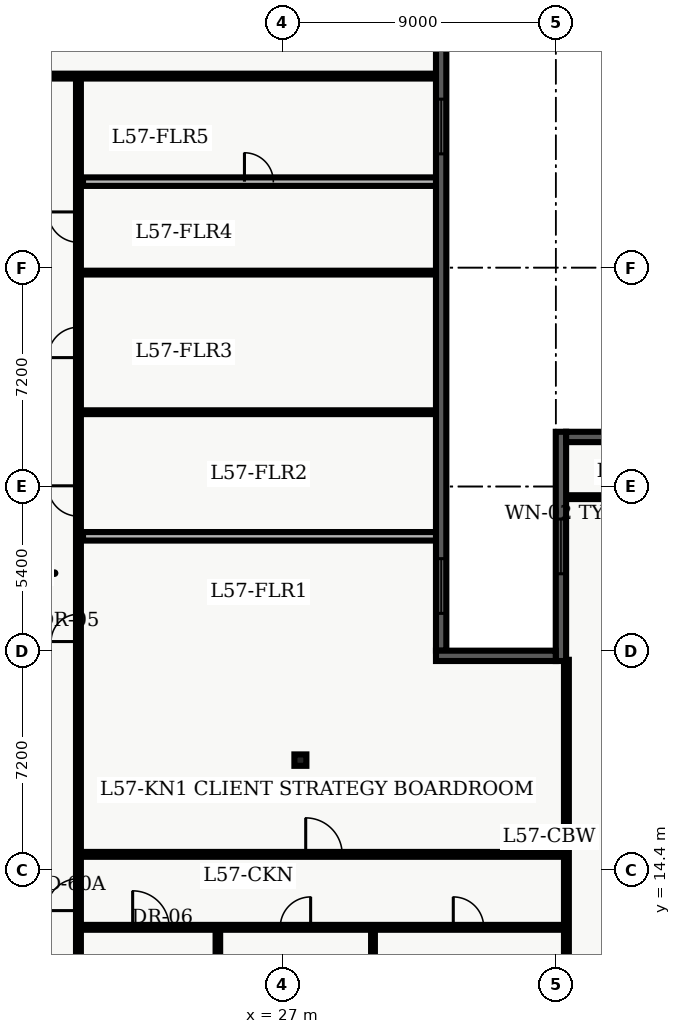
"""IFC4 building model, lengths in metres.
Left out: names, types, materials, properties, quantities, classifications, styles, units other than length and angle.
Written with IfcOpenShell. Run it as: python <this file> out.ifc"""

import sys

from ifc_helpers import new_model, entity, si_unit, converted_unit, direction, frame, origin_with_axes, origin_2d_with_axis, place, context, subcontext, project, spatial, polyline, rectangle, i_section, outline, extrude, element, fill, save


model = new_model("IFC4")
c1 = context("Model", 3, precision=1e-05, world=origin_with_axes(), true_north=direction((0.0, 1.0)))
c2 = subcontext(c1, "Body", "Model", "MODEL_VIEW")
j1 = project(units=[si_unit("LENGTHUNIT", "METRE"), converted_unit("PLANEANGLEUNIT", "DEGREE", entity("IfcPlaneAngleMeasure", 0.017), si_unit("PLANEANGLEUNIT", "RADIAN"), dimensions=[0, 0, 0, 0, 0, 0, 0])], contexts=[c1])
p1 = place(None, origin_with_axes())
s1 = spatial("IfcSite", under=j1, at=p1, CompositionType="ELEMENT")
p2 = place(p1, origin_with_axes())
s2 = spatial("IfcBuilding", under=s1, at=p2, CompositionType="ELEMENT")
p3 = place(p2, frame((0.0, 0.0, 232.5), z_axis=(0.0, 0.0, 1.0), x_axis=(1.0, 0.0, 0.0)))
s3 = spatial("IfcBuildingStorey", under=s2, at=p3, CompositionType="ELEMENT", Elevation=232.5)
p4 = place(p3, frame((27.6, 18.0, 0.0), z_axis=(0.0, 0.0, 1.0), x_axis=(1.0, 0.0, 0.0)))
e1 = element("IfcColumn", 1, at=p4, inside=s3, PredefinedType="COLUMN", context=c2, shape_type="SweptSolid", body=[
    extrude(i_section(OverallWidth=0.394, OverallDepth=0.375, WebThickness=0.017, FlangeThickness=0.028, FilletRadius=0.02, at=origin_2d_with_axis()), origin_with_axes(), (0.0, 0.0, 1.0), 3.9),
])
p5 = place(p3, frame((7.1, 40.5, 0.0), z_axis=(0.0, 0.0, 1.0), x_axis=(1.0, 0.0, 0.0)))
e2 = element("IfcWall", 2, at=p5, inside=s3, PredefinedType="PARTITIONING", context=c2, shape_type="SweptSolid", body=[
    extrude(outline(polyline([(0.0, -0.08), (24.965, -0.08), (24.965, 0.08), (0.0, 0.08), (0.0, -0.08)])), origin_with_axes(), (0.0, 0.0, 1.0), 2.7),
])
p6 = place(p5, frame((2.145, 0.0, 0.0), z_axis=(0.0, 0.0, 1.0), x_axis=(1.0, 0.0, 0.0)))
e3 = element("IfcOpeningElement", 3, at=p6, cuts=e2, PredefinedType="OPENING", context=c2, shape_type="SweptSolid", body=[
    extrude(rectangle(XDim=1.0, YDim=0.18, at=origin_2d_with_axis()), origin_with_axes(), (0.0, 0.0, 1.0), 2.15),
])
p7 = place(p5, frame((5.514, 0.0, 0.0), z_axis=(0.0, 0.0, 1.0), x_axis=(1.0, 0.0, 0.0)))
e4 = element("IfcOpeningElement", 4, at=p7, cuts=e2, PredefinedType="OPENING", context=c2, shape_type="SweptSolid", body=[
    extrude(rectangle(XDim=1.0, YDim=0.18, at=origin_2d_with_axis()), origin_with_axes(), (0.0, 0.0, 1.0), 2.15),
])
p8 = place(p5, frame((8.217, 0.0, 0.0), z_axis=(0.0, 0.0, 1.0), x_axis=(1.0, 0.0, 0.0)))
e5 = element("IfcOpeningElement", 5, at=p8, cuts=e2, PredefinedType="OPENING", context=c2, shape_type="SweptSolid", body=[
    extrude(rectangle(XDim=1.0, YDim=0.18, at=origin_2d_with_axis()), origin_with_axes(), (0.0, 0.0, 1.0), 2.15),
])
p9 = place(p5, frame((11.083, 0.0, 0.0), z_axis=(0.0, 0.0, 1.0), x_axis=(1.0, 0.0, 0.0)))
e6 = element("IfcOpeningElement", 6, at=p9, cuts=e2, PredefinedType="OPENING", context=c2, shape_type="SweptSolid", body=[
    extrude(rectangle(XDim=1.0, YDim=0.18, at=origin_2d_with_axis()), origin_with_axes(), (0.0, 0.0, 1.0), 2.15),
])
p10 = place(p3, frame((20.3, 7.8, 0.0), z_axis=(0.0, 0.0, 1.0), x_axis=(0.0, 1.0, 0.0)))
e7 = element("IfcWall", 7, at=p10, inside=s3, PredefinedType="PARTITIONING", context=c2, shape_type="SweptSolid", body=[
    extrude(outline(polyline([(0.0, -0.08), (32.7, -0.08), (32.7, 0.08), (0.0, 0.08), (0.0, -0.08)])), origin_with_axes(), (0.0, 0.0, 1.0), 2.7),
])
p11 = place(p10, frame((14.55, 0.0, 0.0), z_axis=(0.0, 0.0, 1.0), x_axis=(1.0, 0.0, 0.0)))
e8 = element("IfcOpeningElement", 8, at=p11, cuts=e7, PredefinedType="OPENING", context=c2, shape_type="SweptSolid", body=[
    extrude(rectangle(XDim=0.9, YDim=0.18, at=origin_2d_with_axis()), origin_with_axes(), (0.0, 0.0, 1.0), 2.15),
])
p12 = place(p10, frame((18.723, 0.0, 0.0), z_axis=(0.0, 0.0, 1.0), x_axis=(1.0, 0.0, 0.0)))
e9 = element("IfcOpeningElement", 9, at=p12, cuts=e7, PredefinedType="OPENING", context=c2, shape_type="SweptSolid", body=[
    extrude(rectangle(XDim=1.0, YDim=0.18, at=origin_2d_with_axis()), origin_with_axes(), (0.0, 0.0, 1.0), 2.15),
])
p13 = place(p10, frame((23.94, 0.0, 0.0), z_axis=(0.0, 0.0, 1.0), x_axis=(1.0, 0.0, 0.0)))
e10 = element("IfcOpeningElement", 10, at=p13, cuts=e7, PredefinedType="OPENING", context=c2, shape_type="SweptSolid", body=[
    extrude(rectangle(XDim=1.0, YDim=0.18, at=origin_2d_with_axis()), origin_with_axes(), (0.0, 0.0, 1.0), 2.15),
])
p14 = place(p10, frame((27.732, 0.0, 0.0), z_axis=(0.0, 0.0, 1.0), x_axis=(1.0, 0.0, 0.0)))
e11 = element("IfcOpeningElement", 11, at=p14, cuts=e7, PredefinedType="OPENING", context=c2, shape_type="SweptSolid", body=[
    extrude(rectangle(XDim=1.0, YDim=0.18, at=origin_2d_with_axis()), origin_with_axes(), (0.0, 0.0, 1.0), 2.15),
])
p15 = place(p10, frame((5.775, 0.0, 0.0), z_axis=(0.0, 0.0, 1.0), x_axis=(1.0, 0.0, 0.0)))
e12 = element("IfcOpeningElement", 12, at=p15, cuts=e7, PredefinedType="OPENING", context=c2, shape_type="SweptSolid", body=[
    extrude(rectangle(XDim=1.05, YDim=0.18, at=origin_2d_with_axis()), origin_with_axes(), (0.0, 0.0, 1.0), 2.15),
])
p16 = place(p3, frame((20.45, 25.362, 0.0), z_axis=(0.0, 0.0, 1.0), x_axis=(1.0, 0.0, 0.0)))
e13 = element("IfcWall", 13, at=p16, inside=s3, PredefinedType="PARTITIONING", context=c2, shape_type="SweptSolid", body=[
    extrude(outline(polyline([(0.0, -0.14), (11.615, -0.14), (11.615, 0.14), (0.0, 0.14), (0.0, -0.14)])), origin_with_axes(), (0.0, 0.0, 1.0), 2.7),
])
for number, where, z_axis, x_axis in (
    (14, (20.45, 29.444, 0.0), (0.0, 0.0, 1.0), (1.0, 0.0, 0.0)),
    (15, (20.45, 34.036, 0.0), (0.0, 0.0, 1.0), (1.0, 0.0, 0.0)),
):
    element("IfcWall", number, at=place(p3, frame(where, z_axis=z_axis, x_axis=x_axis)), inside=s3, PredefinedType="PARTITIONING", context=c2, shape_type="SweptSolid", body=[
        extrude(outline(polyline([(0.0, -0.062), (11.615, -0.062), (11.615, 0.062), (0.0, 0.062), (0.0, -0.062)])), origin_with_axes(), (0.0, 0.0, 1.0), 2.7),
    ])
p17 = place(p3, frame((20.45, 37.028, 0.0), z_axis=(0.0, 0.0, 1.0), x_axis=(1.0, 0.0, 0.0)))
e16 = element("IfcWall", 16, at=p17, inside=s3, PredefinedType="PARTITIONING", context=c2, shape_type="SweptSolid", body=[
    extrude(outline(polyline([(0.0, -0.14), (11.615, -0.14), (11.615, 0.14), (0.0, 0.14), (0.0, -0.14)])), origin_with_axes(), (0.0, 0.0, 1.0), 2.7),
])
p18 = place(p17, frame((5.785, 0.0, 0.0), z_axis=(0.0, 0.0, 1.0), x_axis=(1.0, 0.0, 0.0)))
e17 = element("IfcOpeningElement", 17, at=p18, cuts=e16, PredefinedType="OPENING", context=c2, shape_type="SweptSolid", body=[
    extrude(rectangle(XDim=0.95, YDim=0.3, at=origin_2d_with_axis()), origin_with_axes(), (0.0, 0.0, 1.0), 2.15),
])
p19 = place(p3, frame((20.3, 12.5, 0.0), z_axis=(0.0, 0.0, 1.0), x_axis=(1.0, 0.0, 0.0)))
e18 = element("IfcWall", 18, at=p19, inside=s3, PredefinedType="PARTITIONING", context=c2, shape_type="SweptSolid", body=[
    extrude(outline(polyline([(0.0, -0.08), (16.05, -0.08), (16.05, 0.08), (0.0, 0.08), (0.0, -0.08)])), origin_with_axes(), (0.0, 0.0, 1.0), 2.7),
])
p20 = place(p19, frame((2.383, 0.0, 0.0), z_axis=(0.0, 0.0, 1.0), x_axis=(1.0, 0.0, 0.0)))
e19 = element("IfcOpeningElement", 19, at=p20, cuts=e18, PredefinedType="OPENING", context=c2, shape_type="SweptSolid", body=[
    extrude(rectangle(XDim=1.2, YDim=0.18, at=origin_2d_with_axis()), origin_with_axes(), (0.0, 0.0, 1.0), 2.2),
])
p21 = place(p19, frame((7.137, 0.0, 0.0), z_axis=(0.0, 0.0, 1.0), x_axis=(1.0, 0.0, 0.0)))
e20 = element("IfcOpeningElement", 20, at=p21, cuts=e18, PredefinedType="OPENING", context=c2, shape_type="SweptSolid", body=[
    extrude(rectangle(XDim=1.0, YDim=0.18, at=origin_2d_with_axis()), origin_with_axes(), (0.0, 0.0, 1.0), 2.15),
])
p22 = place(p19, frame((12.829, 0.0, 0.0), z_axis=(0.0, 0.0, 1.0), x_axis=(1.0, 0.0, 0.0)))
e21 = element("IfcOpeningElement", 21, at=p22, cuts=e18, PredefinedType="OPENING", context=c2, shape_type="SweptSolid", body=[
    extrude(rectangle(XDim=1.0, YDim=0.18, at=origin_2d_with_axis()), origin_with_axes(), (0.0, 0.0, 1.0), 2.15),
])
p23 = place(p3, frame((20.3, 14.9, 0.0), z_axis=(0.0, 0.0, 1.0), x_axis=(1.0, 0.0, 0.0)))
e22 = element("IfcWall", 22, at=p23, inside=s3, PredefinedType="PARTITIONING", context=c2, shape_type="SweptSolid", body=[
    extrude(outline(polyline([(0.0, -0.08), (16.05, -0.08), (16.05, 0.08), (0.0, 0.08), (0.0, -0.08)])), origin_with_axes(), (0.0, 0.0, 1.0), 2.7),
])
p24 = place(p23, frame((8.075, 0.0, 0.0), z_axis=(0.0, 0.0, 1.0), x_axis=(1.0, 0.0, 0.0)))
e23 = element("IfcOpeningElement", 23, at=p24, cuts=e22, PredefinedType="OPENING", context=c2, shape_type="SweptSolid", body=[
    extrude(rectangle(XDim=1.2, YDim=0.18, at=origin_2d_with_axis()), origin_with_axes(), (0.0, 0.0, 1.0), 2.2),
])
p25 = place(p3, frame((36.35, 4.35, 0.0), z_axis=(0.0, 0.0, 1.0), x_axis=(0.0, 1.0, 0.0)))
e24 = element("IfcWall", 24, at=p25, inside=s3, PredefinedType="PARTITIONING", context=c2, shape_type="SweptSolid", body=[
    extrude(outline(polyline([(0.0, -0.08), (16.95, -0.08), (16.95, 0.08), (0.0, 0.08), (0.0, -0.08)])), origin_with_axes(), (0.0, 0.0, 1.0), 2.7),
])
p26 = place(p3, frame((24.886, 0.335, 0.0), z_axis=(0.0, 0.0, 1.0), x_axis=(0.0, 1.0, 0.0)))
e25 = element("IfcWall", 25, at=p26, inside=s3, PredefinedType="PARTITIONING", context=c2, shape_type="SweptSolid", body=[
    extrude(outline(polyline([(0.0, -0.075), (12.045, -0.075), (12.045, 0.075), (0.0, 0.075), (0.0, -0.075)])), origin_with_axes(), (0.0, 0.0, 1.0), 2.7),
])
p27 = place(p3, frame((29.988, 0.335, 0.0), z_axis=(0.0, 0.0, 1.0), x_axis=(0.0, 1.0, 0.0)))
e26 = element("IfcWall", 26, at=p27, inside=s3, PredefinedType="PARTITIONING", context=c2, shape_type="SweptSolid", body=[
    extrude(outline(polyline([(0.0, -0.062), (12.045, -0.062), (12.045, 0.062), (0.0, 0.062), (0.0, -0.062)])), origin_with_axes(), (0.0, 0.0, 1.0), 2.7),
])
p28 = place(p3, frame((36.335, 26.65, 0.0), z_axis=(0.0, 0.0, 1.0), x_axis=(1.0, 0.0, 0.0)))
e27 = element("IfcWall", 27, at=p28, inside=s3, PredefinedType="PARTITIONING", context=c2, shape_type="SweptSolid", body=[
    extrude(outline(polyline([(0.0, -0.062), (11.195, -0.062), (11.195, 0.062), (0.0, 0.062), (0.0, -0.062)])), origin_with_axes(), (0.0, 0.0, 1.0), 2.7),
])
p29 = place(p28, frame((6.665, 0.0, 0.0), z_axis=(0.0, 0.0, 1.0), x_axis=(1.0, 0.0, 0.0)))
e28 = element("IfcOpeningElement", 28, at=p29, cuts=e27, PredefinedType="OPENING", context=c2, shape_type="SweptSolid", body=[
    extrude(rectangle(XDim=1.0, YDim=0.145, at=origin_2d_with_axis()), origin_with_axes(), (0.0, 0.0, 1.0), 2.15),
])
p30 = place(p3, frame((36.17, 21.26, 0.0), z_axis=(0.0, 0.0, 1.0), x_axis=(0.0, 1.0, 0.0)))
e29 = element("IfcWall", 29, at=p30, inside=s3, PredefinedType="SOLIDWALL", context=c2, shape_type="SweptSolid", body=[
    extrude(outline(polyline([(0.0, -0.17), (7.54, -0.17), (7.54, 0.17), (0.0, 0.17), (0.0, -0.17)])), origin_with_axes(), (0.0, 0.0, 1.0), 3.66),
])
p31 = place(p30, frame((3.77, 0.0, 0.45), z_axis=(0.0, 0.0, 1.0), x_axis=(1.0, 0.0, 0.0)))
e30 = element("IfcOpeningElement", 30, at=p31, cuts=e29, PredefinedType="OPENING", context=c2, shape_type="SweptSolid", body=[
    extrude(rectangle(XDim=1.8, YDim=0.36, at=origin_2d_with_axis()), origin_with_axes(), (0.0, 0.0, 1.0), 2.1),
])
p32 = place(p3, frame((36.34, 28.63, 0.0), z_axis=(0.0, 0.0, 1.0), x_axis=(1.0, 0.0, 0.0)))
e31 = element("IfcWall", 31, at=p32, inside=s3, PredefinedType="SOLIDWALL", context=c2, shape_type="SweptSolid", body=[
    extrude(outline(polyline([(0.0, -0.17), (13.46, -0.17), (13.46, 0.17), (0.0, 0.17), (0.0, -0.17)])), origin_with_axes(), (0.0, 0.0, 1.0), 3.66),
])
p33 = place(p32, frame((3.665, 0.0, 0.45), z_axis=(0.0, 0.0, 1.0), x_axis=(1.0, 0.0, 0.0)))
e32 = element("IfcOpeningElement", 32, at=p33, cuts=e31, PredefinedType="OPENING", context=c2, shape_type="SweptSolid", body=[
    extrude(rectangle(XDim=1.8, YDim=0.36, at=origin_2d_with_axis()), origin_with_axes(), (0.0, 0.0, 1.0), 2.1),
])
p34 = place(p32, frame((9.795, 0.0, 0.45), z_axis=(0.0, 0.0, 1.0), x_axis=(1.0, 0.0, 0.0)))
e33 = element("IfcOpeningElement", 33, at=p34, cuts=e31, PredefinedType="OPENING", context=c2, shape_type="SweptSolid", body=[
    extrude(rectangle(XDim=1.8, YDim=0.36, at=origin_2d_with_axis()), origin_with_axes(), (0.0, 0.0, 1.0), 2.1),
])
p35 = place(p3, frame((32.23, 41.82, 0.0), z_axis=(0.0, 0.0, 1.0), x_axis=(0.0, -1.0, 0.0)))
e34 = element("IfcWall", 34, at=p35, inside=s3, PredefinedType="SOLIDWALL", context=c2, shape_type="SweptSolid", body=[
    extrude(outline(polyline([(0.0, -0.17), (20.22, -0.17), (20.22, 0.17), (0.0, 0.17), (0.0, -0.17)])), origin_with_axes(), (0.0, 0.0, 1.0), 3.66),
])
p36 = place(p35, frame((2.978, 0.0, 0.45), z_axis=(0.0, 0.0, 1.0), x_axis=(1.0, 0.0, 0.0)))
e35 = element("IfcOpeningElement", 35, at=p36, cuts=e34, PredefinedType="OPENING", context=c2, shape_type="SweptSolid", body=[
    extrude(rectangle(XDim=1.8, YDim=0.36, at=origin_2d_with_axis()), origin_with_axes(), (0.0, 0.0, 1.0), 2.1),
])
p37 = place(p35, frame((18.093, 0.0, 0.45), z_axis=(0.0, 0.0, 1.0), x_axis=(1.0, 0.0, 0.0)))
e36 = element("IfcOpeningElement", 36, at=p37, cuts=e34, PredefinedType="OPENING", context=c2, shape_type="SweptSolid", body=[
    extrude(rectangle(XDim=1.8, YDim=0.36, at=origin_2d_with_axis()), origin_with_axes(), (0.0, 0.0, 1.0), 2.1),
])
p38 = place(p3, frame((32.06, 21.43, 0.0), z_axis=(0.0, 0.0, 1.0), x_axis=(1.0, 0.0, 0.0)))
e37 = element("IfcWall", 37, at=p38, inside=s3, PredefinedType="SOLIDWALL", context=c2, shape_type="SweptSolid", body=[
    extrude(outline(polyline([(0.0, -0.17), (3.94, -0.17), (3.94, 0.17), (0.0, 0.17), (0.0, -0.17)])), origin_with_axes(), (0.0, 0.0, 1.0), 3.66),
])
p39 = place(p10, frame((14.55, 0.0, 0.0), z_axis=(0.0, 0.0, 1.0), x_axis=(1.0, 0.0, 0.0)))
e38 = element("IfcDoor", 38, at=p39, inside=s3, OperationType="SINGLE_SWING_LEFT", PredefinedType="DOOR", context=c2, shape_type="SweptSolid", body=[
    extrude(rectangle(XDim=0.9, YDim=0.09, at=origin_2d_with_axis()), origin_with_axes(), (0.0, 0.0, 1.0), 2.15),
])
fill(e8, e38)
p40 = place(p10, frame((18.723, 0.0, 0.0), z_axis=(0.0, 0.0, 1.0), x_axis=(1.0, 0.0, 0.0)))
e39 = element("IfcDoor", 39, at=p40, inside=s3, OperationType="SINGLE_SWING_RIGHT", PredefinedType="DOOR", context=c2, shape_type="SweptSolid", body=[
    extrude(rectangle(XDim=1.0, YDim=0.09, at=origin_2d_with_axis()), origin_with_axes(), (0.0, 0.0, 1.0), 2.15),
])
fill(e9, e39)
p41 = place(p10, frame((23.94, 0.0, 0.0), z_axis=(0.0, 0.0, 1.0), x_axis=(1.0, 0.0, 0.0)))
e40 = element("IfcDoor", 40, at=p41, inside=s3, OperationType="SINGLE_SWING_LEFT", PredefinedType="DOOR", context=c2, shape_type="SweptSolid", body=[
    extrude(rectangle(XDim=1.0, YDim=0.09, at=origin_2d_with_axis()), origin_with_axes(), (0.0, 0.0, 1.0), 2.15),
])
fill(e10, e40)
p42 = place(p10, frame((27.732, 0.0, 0.0), z_axis=(0.0, 0.0, 1.0), x_axis=(1.0, 0.0, 0.0)))
e41 = element("IfcDoor", 41, at=p42, inside=s3, OperationType="SINGLE_SWING_RIGHT", PredefinedType="DOOR", context=c2, shape_type="SweptSolid", body=[
    extrude(rectangle(XDim=1.0, YDim=0.09, at=origin_2d_with_axis()), origin_with_axes(), (0.0, 0.0, 1.0), 2.15),
])
fill(e11, e41)
p43 = place(p17, frame((5.785, 0.0, 0.0), z_axis=(0.0, 0.0, 1.0), x_axis=(1.0, 0.0, 0.0)))
e42 = element("IfcDoor", 42, at=p43, inside=s3, OperationType="SINGLE_SWING_LEFT", PredefinedType="DOOR", context=c2, shape_type="SweptSolid", body=[
    extrude(rectangle(XDim=0.95, YDim=0.09, at=origin_2d_with_axis()), origin_with_axes(), (0.0, 0.0, 1.0), 2.15),
])
fill(e17, e42)
p44 = place(p10, frame((5.775, 0.0, 0.0), z_axis=(0.0, 0.0, 1.0), x_axis=(1.0, 0.0, 0.0)))
e43 = element("IfcDoor", 43, at=p44, inside=s3, OperationType="SINGLE_SWING_LEFT", PredefinedType="DOOR", context=c2, shape_type="SweptSolid", body=[
    extrude(rectangle(XDim=1.05, YDim=0.09, at=origin_2d_with_axis()), origin_with_axes(), (0.0, 0.0, 1.0), 2.15),
])
fill(e12, e43)
p45 = place(p19, frame((2.383, 0.0, 0.0), z_axis=(0.0, 0.0, 1.0), x_axis=(1.0, 0.0, 0.0)))
e44 = element("IfcDoor", 44, at=p45, inside=s3, OperationType="SINGLE_SWING_LEFT", PredefinedType="DOOR", context=c2, shape_type="SweptSolid", body=[
    extrude(rectangle(XDim=1.2, YDim=0.09, at=origin_2d_with_axis()), origin_with_axes(), (0.0, 0.0, 1.0), 2.2),
])
fill(e19, e44)
p46 = place(p19, frame((7.137, 0.0, 0.0), z_axis=(0.0, 0.0, 1.0), x_axis=(1.0, 0.0, 0.0)))
e45 = element("IfcDoor", 45, at=p46, inside=s3, OperationType="SINGLE_SWING_RIGHT", PredefinedType="DOOR", context=c2, shape_type="SweptSolid", body=[
    extrude(rectangle(XDim=1.0, YDim=0.09, at=origin_2d_with_axis()), origin_with_axes(), (0.0, 0.0, 1.0), 2.15),
])
fill(e20, e45)
p47 = place(p19, frame((12.829, 0.0, 0.0), z_axis=(0.0, 0.0, 1.0), x_axis=(1.0, 0.0, 0.0)))
e46 = element("IfcDoor", 46, at=p47, inside=s3, OperationType="SINGLE_SWING_LEFT", PredefinedType="DOOR", context=c2, shape_type="SweptSolid", body=[
    extrude(rectangle(XDim=1.0, YDim=0.09, at=origin_2d_with_axis()), origin_with_axes(), (0.0, 0.0, 1.0), 2.15),
])
fill(e21, e46)
p48 = place(p23, frame((8.075, 0.0, 0.0), z_axis=(0.0, 0.0, 1.0), x_axis=(1.0, 0.0, 0.0)))
e47 = element("IfcDoor", 47, at=p48, inside=s3, OperationType="SINGLE_SWING_LEFT", PredefinedType="DOOR", context=c2, shape_type="SweptSolid", body=[
    extrude(rectangle(XDim=1.2, YDim=0.09, at=origin_2d_with_axis()), origin_with_axes(), (0.0, 0.0, 1.0), 2.2),
])
fill(e23, e47)
p49 = place(p30, frame((3.77, 0.0, 0.45), z_axis=(0.0, 0.0, 1.0), x_axis=(1.0, 0.0, 0.0)))
e48 = element("IfcWindow", 48, at=p49, inside=s3, PredefinedType="WINDOW", context=c2, shape_type="SweptSolid", body=[
    extrude(rectangle(XDim=1.8, YDim=0.09, at=origin_2d_with_axis()), origin_with_axes(), (0.0, 0.0, 1.0), 2.1),
])
fill(e30, e48)
p50 = place(p35, frame((2.978, 0.0, 0.45), z_axis=(0.0, 0.0, 1.0), x_axis=(1.0, 0.0, 0.0)))
e49 = element("IfcWindow", 49, at=p50, inside=s3, PredefinedType="WINDOW", context=c2, shape_type="SweptSolid", body=[
    extrude(rectangle(XDim=1.8, YDim=0.09, at=origin_2d_with_axis()), origin_with_axes(), (0.0, 0.0, 1.0), 2.1),
])
fill(e35, e49)
p51 = place(p35, frame((18.093, 0.0, 0.45), z_axis=(0.0, 0.0, 1.0), x_axis=(1.0, 0.0, 0.0)))
e50 = element("IfcWindow", 50, at=p51, inside=s3, PredefinedType="WINDOW", context=c2, shape_type="SweptSolid", body=[
    extrude(rectangle(XDim=1.8, YDim=0.09, at=origin_2d_with_axis()), origin_with_axes(), (0.0, 0.0, 1.0), 2.1),
])
fill(e36, e50)
save(model, sys.argv[1])
